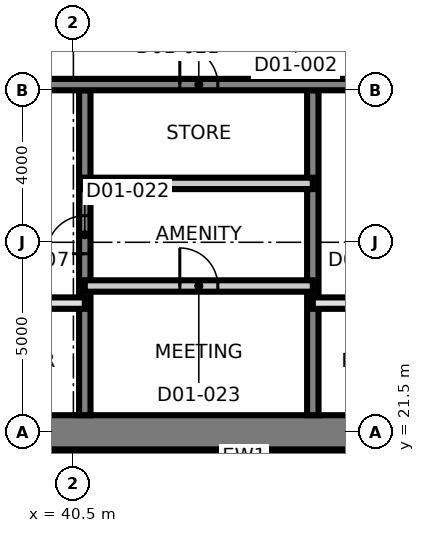
"""IFC4 building model, lengths in metres.
Left out: names, types, materials, properties, quantities, classifications, styles, units other than length and angle.
Written with IfcOpenShell. Run it as: python <this file> out.ifc"""

import sys

from ifc_helpers import new_model, si_unit, direction, frame, frame_2d, origin, place, context, subcontext, project, spatial, rectangle, extrude, element, fill, save


model = new_model("IFC4")
c1 = context("Model", 3, precision=1e-05, world=origin(), true_north=direction((0.0, 1.0)))
c2 = subcontext(c1, "Body", "Model", "MODEL_VIEW")
j1 = project(units=[si_unit("LENGTHUNIT", "METRE"), si_unit("PLANEANGLEUNIT", "RADIAN")], contexts=[c1])
p1 = place(None, origin())
s1 = spatial("IfcSite", under=j1, at=p1, CompositionType="ELEMENT")
p2 = place(p1, origin())
s2 = spatial("IfcBuilding", under=s1, at=p2, CompositionType="ELEMENT")
p3 = place(p2, frame((0.0, 0.0, 33.5)))
s3 = spatial("IfcBuildingStorey", under=s2, at=p3, CompositionType="ELEMENT", Elevation=33.5)
p4 = place(p3, frame((31.05, 21.5, 0.0), z_axis=(0.0, 0.0, 1.0), x_axis=(1.0, 0.0, 0.0)))
e1 = element("IfcWall", 1, at=p4, inside=s3, PredefinedType="SHEAR", context=c2, shape_type="SweptSolid", body=[
    extrude(rectangle(XDim=27.0, YDim=0.9, at=frame_2d((13.5, 0.0))), origin(), (0.0, 0.0, 1.0), 3.7),
])
p5 = place(p3, frame((40.8, 21.95, 0.0), z_axis=(0.0, 0.0, 1.0), x_axis=(0.0, 1.0, 0.0)))
e2 = element("IfcWall", 2, at=p5, inside=s3, PredefinedType="SHEAR", context=c2, shape_type="SweptSolid", body=[
    extrude(rectangle(XDim=8.55, YDim=0.3, at=frame_2d((4.275, 0.0))), origin(), (0.0, 0.0, 1.0), 3.7),
])
p6 = place(p5, frame((4.25, 0.0, 0.0)))
e3 = element("IfcOpeningElement", 3, at=p6, cuts=e2, PredefinedType="OPENING", context=c2, shape_type="SweptSolid", body=[
    extrude(rectangle(XDim=1.0, YDim=2.1, at=frame_2d((0.5, 1.05))), frame((0.0, 0.16, 0.0), z_axis=(0.0, -1.0, 0.0), x_axis=(1.0, 0.0, 0.0)), (0.0, 0.0, 1.0), 0.32),
])
p7 = place(p3, frame((46.8, 21.95, 0.0), z_axis=(0.0, 0.0, 1.0), x_axis=(0.0, 1.0, 0.0)))
e4 = element("IfcWall", 4, at=p7, inside=s3, PredefinedType="SHEAR", context=c2, shape_type="SweptSolid", body=[
    extrude(rectangle(XDim=8.55, YDim=0.3, at=frame_2d((4.275, 0.0))), origin(), (0.0, 0.0, 1.0), 3.7),
])
p8 = place(p3, frame((31.95, 30.65, 0.0), z_axis=(0.0, 0.0, 1.0), x_axis=(1.0, 0.0, 0.0)))
e5 = element("IfcWall", 5, at=p8, inside=s3, PredefinedType="SHEAR", context=c2, shape_type="SweptSolid", body=[
    extrude(rectangle(XDim=26.1, YDim=0.3, at=frame_2d((13.05, 0.0))), origin(), (0.0, 0.0, 1.0), 3.7),
])
p9 = place(p8, frame((24.55, 0.0, 0.0)))
e6 = element("IfcOpeningElement", 6, at=p9, cuts=e5, PredefinedType="OPENING", context=c2, shape_type="SweptSolid", body=[
    extrude(rectangle(XDim=1.0, YDim=2.1, at=frame_2d((0.5, 1.05))), frame((0.0, 0.16, 0.0), z_axis=(0.0, -1.0, 0.0), x_axis=(1.0, 0.0, 0.0)), (0.0, 0.0, 1.0), 0.32),
])
p10 = place(p8, frame((11.35, 0.0, 0.0)))
e7 = element("IfcOpeningElement", 7, at=p10, cuts=e5, PredefinedType="OPENING", context=c2, shape_type="SweptSolid", body=[
    extrude(rectangle(XDim=1.0, YDim=2.1, at=frame_2d((0.5, 1.05))), frame((0.0, 0.16, 0.0), z_axis=(0.0, -1.0, 0.0), x_axis=(1.0, 0.0, 0.0)), (0.0, 0.0, 1.0), 0.32),
])
p11 = place(p3, frame((31.36, 20.85, 0.0), z_axis=(0.0, 0.0, 1.0), x_axis=(1.0, 0.0, 0.0)))
e8 = element("IfcWall", 8, at=p11, inside=s3, PredefinedType="SOLIDWALL", context=c2, shape_type="SweptSolid", body=[
    extrude(rectangle(XDim=27.281, YDim=0.3, at=frame_2d((13.64, 0.0))), origin(), (0.0, 0.0, 1.0), 3.4),
])
p12 = place(p3, frame((31.8, 24.9, 0.0), z_axis=(0.0, 0.0, 1.0), x_axis=(1.0, 0.0, 0.0)))
e9 = element("IfcWall", 9, at=p12, inside=s3, PredefinedType="SOLIDWALL", context=c2, shape_type="SweptSolid", body=[
    extrude(rectangle(XDim=9.0, YDim=0.3, at=frame_2d((4.5, 0.0))), origin(), (0.0, 0.0, 1.0), 3.4),
])
p13 = place(p12, frame((7.05, 0.0, 0.0)))
e10 = element("IfcOpeningElement", 10, at=p13, cuts=e9, PredefinedType="OPENING", context=c2, shape_type="SweptSolid", body=[
    extrude(rectangle(XDim=0.9, YDim=2.1, at=frame_2d((0.45, 1.05))), frame((0.0, 0.16, 0.0), z_axis=(0.0, -1.0, 0.0), x_axis=(1.0, 0.0, 0.0)), (0.0, 0.0, 1.0), 0.32),
])
p14 = place(p12, frame((0.95, 0.0, 0.0)))
e11 = element("IfcOpeningElement", 11, at=p14, cuts=e9, PredefinedType="OPENING", context=c2, shape_type="SweptSolid", body=[
    extrude(rectangle(XDim=1.1, YDim=2.4, at=frame_2d((0.55, 1.2))), frame((0.0, 0.16, 0.0), z_axis=(0.0, -1.0, 0.0), x_axis=(1.0, 0.0, 0.0)), (0.0, 0.0, 1.0), 0.32),
])
p15 = place(p12, frame((3.95, 0.0, 0.0)))
e12 = element("IfcOpeningElement", 12, at=p15, cuts=e9, PredefinedType="OPENING", context=c2, shape_type="SweptSolid", body=[
    extrude(rectangle(XDim=1.1, YDim=2.4, at=frame_2d((0.55, 1.2))), frame((0.0, 0.16, 0.0), z_axis=(0.0, -1.0, 0.0), x_axis=(1.0, 0.0, 0.0)), (0.0, 0.0, 1.0), 0.32),
])
p16 = place(p3, frame((46.8, 24.9, 0.0), z_axis=(0.0, 0.0, 1.0), x_axis=(1.0, 0.0, 0.0)))
e13 = element("IfcWall", 13, at=p16, inside=s3, PredefinedType="SOLIDWALL", context=c2, shape_type="SweptSolid", body=[
    extrude(rectangle(XDim=9.0, YDim=0.3, at=frame_2d((4.5, 0.0))), origin(), (0.0, 0.0, 1.0), 3.4),
])
p17 = place(p16, frame((1.05, 0.0, 0.0)))
e14 = element("IfcOpeningElement", 14, at=p17, cuts=e13, PredefinedType="OPENING", context=c2, shape_type="SweptSolid", body=[
    extrude(rectangle(XDim=0.9, YDim=2.1, at=frame_2d((0.45, 1.05))), frame((0.0, 0.16, 0.0), z_axis=(0.0, -1.0, 0.0), x_axis=(1.0, 0.0, 0.0)), (0.0, 0.0, 1.0), 0.32),
])
p18 = place(p3, frame((40.8, 25.35, 0.0), z_axis=(0.0, 0.0, 1.0), x_axis=(1.0, 0.0, 0.0)))
e15 = element("IfcWall", 15, at=p18, inside=s3, PredefinedType="PARTITIONING", context=c2, shape_type="SweptSolid", body=[
    extrude(rectangle(XDim=6.0, YDim=0.3, at=frame_2d((3.0, 0.0))), origin(), (0.0, 0.0, 1.0), 3.4),
])
p19 = place(p18, frame((2.5, 0.0, 0.0)))
e16 = element("IfcOpeningElement", 16, at=p19, cuts=e15, PredefinedType="OPENING", context=c2, shape_type="SweptSolid", body=[
    extrude(rectangle(XDim=1.0, YDim=2.1, at=frame_2d((0.5, 1.05))), frame((0.0, 0.16, 0.0), z_axis=(0.0, -1.0, 0.0), x_axis=(1.0, 0.0, 0.0)), (0.0, 0.0, 1.0), 0.32),
])
p20 = place(p3, frame((40.8, 28.05, 0.0), z_axis=(0.0, 0.0, 1.0), x_axis=(1.0, 0.0, 0.0)))
e17 = element("IfcWall", 17, at=p20, inside=s3, PredefinedType="PARTITIONING", context=c2, shape_type="SweptSolid", body=[
    extrude(rectangle(XDim=6.0, YDim=0.3, at=frame_2d((3.0, 0.0))), origin(), (0.0, 0.0, 1.0), 3.4),
])
p21 = place(p10, origin())
e18 = element("IfcDoor", 18, at=p21, inside=s3, OperationType="SINGLE_SWING_LEFT", PredefinedType="DOOR", context=c2, shape_type="SweptSolid", body=[
    extrude(rectangle(XDim=1.0, YDim=2.1, at=frame_2d((0.5, 1.05))), frame((0.0, 0.025, 0.0), z_axis=(0.0, -1.0, 0.0), x_axis=(1.0, 0.0, 0.0)), (0.0, 0.0, 1.0), 0.05),
])
fill(e7, e18)
p22 = place(p6, origin())
e19 = element("IfcDoor", 19, at=p22, inside=s3, OperationType="SINGLE_SWING_RIGHT", PredefinedType="DOOR", context=c2, shape_type="SweptSolid", body=[
    extrude(rectangle(XDim=1.0, YDim=2.1, at=frame_2d((0.5, 1.05))), frame((0.0, 0.025, 0.0), z_axis=(0.0, -1.0, 0.0), x_axis=(1.0, 0.0, 0.0)), (0.0, 0.0, 1.0), 0.05),
])
fill(e3, e19)
p23 = place(p19, origin())
e20 = element("IfcDoor", 20, at=p23, inside=s3, OperationType="SINGLE_SWING_RIGHT", PredefinedType="DOOR", context=c2, shape_type="SweptSolid", body=[
    extrude(rectangle(XDim=1.0, YDim=2.1, at=frame_2d((0.5, 1.05))), frame((0.0, 0.025, 0.0), z_axis=(0.0, -1.0, 0.0), x_axis=(1.0, 0.0, 0.0)), (0.0, 0.0, 1.0), 0.05),
])
fill(e16, e20)
save(model, sys.argv[1])
